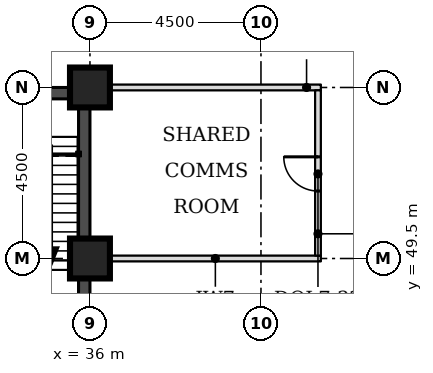
"""IFC4 building model, lengths in metres.
Left out: names, types, materials, properties, quantities, classifications, styles, units other than length and angle.
Written with IfcOpenShell. Run it as: python <this file> out.ifc"""

import sys

from ifc_helpers import new_model, si_unit, direction, frame, frame_2d, origin, origin_2d, place, context, subcontext, project, spatial, rectangle, extrude, element, fill, save


model = new_model("IFC4")
c1 = context("Model", 3, precision=1e-05, world=origin(), true_north=direction((0.0, 1.0)))
c2 = subcontext(c1, "Body", "Model", "MODEL_VIEW")
j1 = project(units=[si_unit("LENGTHUNIT", "METRE"), si_unit("PLANEANGLEUNIT", "RADIAN")], contexts=[c1])
p1 = place(None, origin())
s1 = spatial("IfcSite", under=j1, at=p1, CompositionType="ELEMENT")
p2 = place(p1, origin())
s2 = spatial("IfcBuilding", under=s1, at=p2, CompositionType="ELEMENT")
p3 = place(p2, frame((0.0, 0.0, 134.4)))
s3 = spatial("IfcBuildingStorey", under=s2, at=p3, CompositionType="ELEMENT", Elevation=134.4)
for number, where, z_axis, x_axis in (
    (1, (36.0, 49.5, 0.0), (0.0, 0.0, 1.0), (1.0, 0.0, 0.0)),
    (2, (36.0, 54.0, 0.0), (0.0, 0.0, 1.0), (1.0, 0.0, 0.0)),
):
    element("IfcColumn", number, at=place(p3, frame(where, z_axis=z_axis, x_axis=x_axis)), inside=s3, PredefinedType="COLUMN", context=c2, shape_type="SweptSolid", body=[
        extrude(rectangle(XDim=1.05, YDim=1.05, at=origin_2d()), origin(), (0.0, 0.0, 1.0), 3.7),
    ])
p4 = place(p3, frame((27.3, 53.85, 0.0), z_axis=(0.0, 0.0, 1.0), x_axis=(1.0, 0.0, 0.0)))
e3 = element("IfcWall", 3, at=p4, inside=s3, PredefinedType="SHEAR", context=c2, shape_type="SweptSolid", body=[
    extrude(rectangle(XDim=8.4, YDim=0.3, at=frame_2d((4.2, 0.0))), origin(), (0.0, 0.0, 1.0), 3.7),
])
p5 = place(p4, frame((6.4, 0.0, 0.0)))
e4 = element("IfcOpeningElement", 4, at=p5, cuts=e3, PredefinedType="OPENING", context=c2, shape_type="SweptSolid", body=[
    extrude(rectangle(XDim=1.1, YDim=2.1, at=frame_2d((0.55, 1.05))), frame((0.0, 0.16, 0.0), z_axis=(0.0, -1.0, 0.0), x_axis=(1.0, 0.0, 0.0)), (0.0, 0.0, 1.0), 0.32),
])
p6 = place(p3, frame((35.85, 45.0, 0.0), z_axis=(0.0, 0.0, 1.0), x_axis=(0.0, 1.0, 0.0)))
e5 = element("IfcWall", 5, at=p6, inside=s3, PredefinedType="SHEAR", context=c2, shape_type="SweptSolid", body=[
    extrude(rectangle(XDim=9.0, YDim=0.3, at=frame_2d((4.5, 0.0))), origin(), (0.0, 0.0, 1.0), 3.7),
])
for number, where, z_axis, x_axis in (
    (6, (36.525, 49.5, 0.0), (0.0, 0.0, 1.0), (1.0, 0.0, 0.0)),
    (7, (36.525, 54.0, 0.0), (0.0, 0.0, 1.0), (1.0, 0.0, 0.0)),
):
    element("IfcWall", number, at=place(p3, frame(where, z_axis=z_axis, x_axis=x_axis)), inside=s3, PredefinedType="PARTITIONING", context=c2, shape_type="SweptSolid", body=[
        extrude(rectangle(XDim=5.55, YDim=0.15, at=frame_2d((2.775, 0.0))), origin(), (0.0, 0.0, 1.0), 3.55),
    ])
p7 = place(p3, frame((42.0, 49.575, 0.0), z_axis=(0.0, 0.0, 1.0), x_axis=(0.0, 1.0, 0.0)))
e8 = element("IfcWall", 8, at=p7, inside=s3, PredefinedType="PARTITIONING", context=c2, shape_type="SweptSolid", body=[
    extrude(rectangle(XDim=4.35, YDim=0.15, at=frame_2d((2.175, 0.0))), origin(), (0.0, 0.0, 1.0), 3.55),
])
p8 = place(p7, frame((1.7, 0.0, 0.0)))
e9 = element("IfcOpeningElement", 9, at=p8, cuts=e8, PredefinedType="OPENING", context=c2, shape_type="SweptSolid", body=[
    extrude(rectangle(XDim=0.9, YDim=2.1, at=frame_2d((0.45, 1.05))), frame((0.0, 0.085, 0.0), z_axis=(0.0, -1.0, 0.0), x_axis=(1.0, 0.0, 0.0)), (0.0, 0.0, 1.0), 0.17),
])
p9 = place(p8, origin())
e10 = element("IfcDoor", 10, at=p9, inside=s3, OperationType="SINGLE_SWING_RIGHT", PredefinedType="DOOR", context=c2, shape_type="SweptSolid", body=[
    extrude(rectangle(XDim=0.9, YDim=2.1, at=frame_2d((0.45, 1.05))), frame((0.0, 0.025, 0.0), z_axis=(0.0, -1.0, 0.0), x_axis=(1.0, 0.0, 0.0)), (0.0, 0.0, 1.0), 0.05),
])
fill(e9, e10)
save(model, sys.argv[1])
